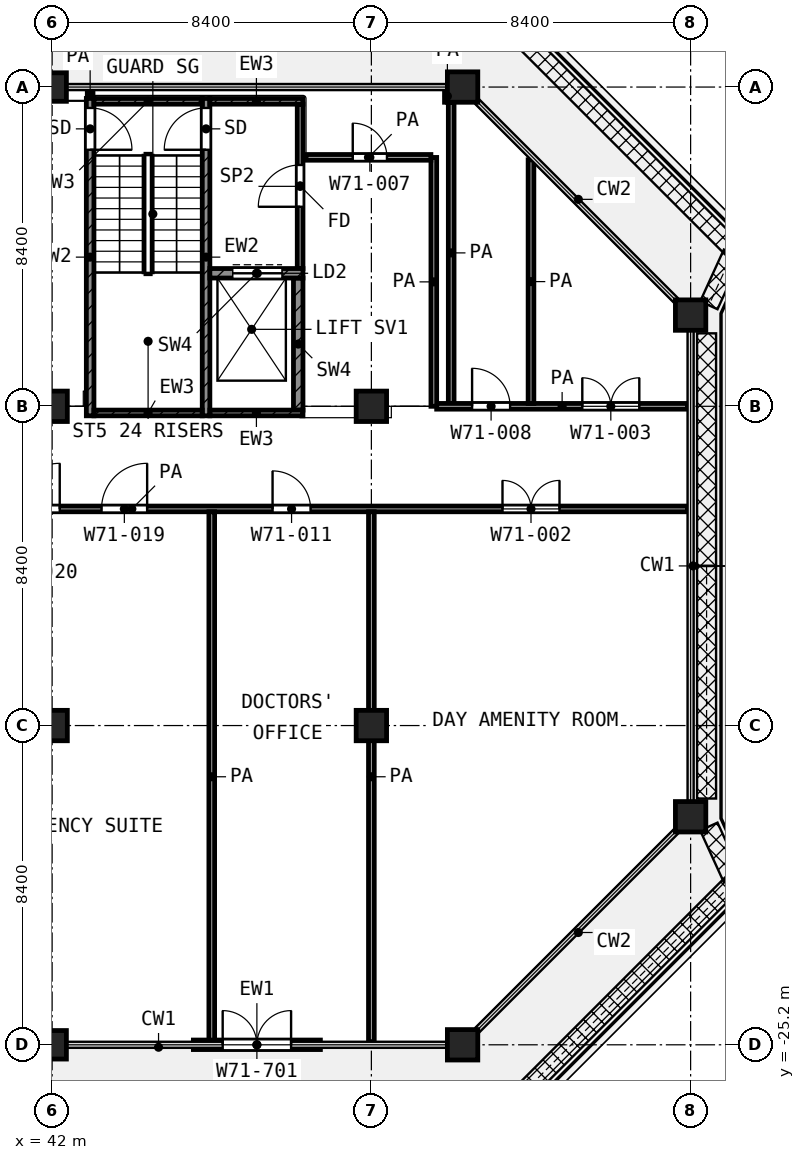
"""IFC4 building model, lengths in metres.
Left out: names, types, materials, properties, quantities, classifications, styles, units other than length and angle.
Written with IfcOpenShell. Run it as: python <this file> out.ifc"""

import sys

from ifc_helpers import new_model, si_unit, direction, frame, frame_2d, origin, origin_2d, place, context, subcontext, project, spatial, rectangle, extrude, element, fill, save


model = new_model("IFC4")
c1 = context("Model", 3, precision=1e-05, world=origin(), true_north=direction((0.0, 1.0)))
c2 = subcontext(c1, "Body", "Model", "MODEL_VIEW")
j1 = project(units=[si_unit("LENGTHUNIT", "METRE"), si_unit("PLANEANGLEUNIT", "RADIAN")], contexts=[c1])
p1 = place(None, origin())
s1 = spatial("IfcSite", under=j1, at=p1, CompositionType="ELEMENT")
p2 = place(p1, origin())
s2 = spatial("IfcBuilding", under=s1, at=p2, CompositionType="ELEMENT")
p3 = place(p2, frame((0.0, 0.0, 328.0)))
s3 = spatial("IfcBuildingStorey", under=s2, at=p3, CompositionType="ELEMENT", Elevation=328.0)
p4 = place(p3, frame((42.0, 0.0, 0.0), z_axis=(0.0, 0.0, 1.0), x_axis=(1.0, 0.0, 0.0)))
e1 = element("IfcColumn", 1, at=p4, inside=s3, PredefinedType="COLUMN", context=c2, shape_type="SweptSolid", body=[
    extrude(rectangle(XDim=0.75, YDim=0.75, at=origin_2d()), origin(), (0.0, 0.0, 1.0), 4.2),
])
for number, where, z_axis, x_axis in (
    (2, (52.8, 0.0, 0.0), (0.0, 0.0, 1.0), (1.0, 0.0, 0.0)),
    (3, (58.8, -6.0, 0.0), (0.0, 0.0, 1.0), (1.0, 0.0, 0.0)),
    (4, (42.0, -8.4, 0.0), (0.0, 0.0, 1.0), (1.0, 0.0, 0.0)),
    (5, (50.4, -8.4, 0.0), (0.0, 0.0, 1.0), (1.0, 0.0, 0.0)),
    (6, (42.0, -16.8, 0.0), (0.0, 0.0, 1.0), (1.0, 0.0, 0.0)),
    (7, (50.4, -16.8, 0.0), (0.0, 0.0, 1.0), (1.0, 0.0, 0.0)),
    (8, (58.8, -19.2, 0.0), (0.0, 0.0, 1.0), (1.0, 0.0, 0.0)),
):
    element("IfcColumn", number, at=place(p3, frame(where, z_axis=z_axis, x_axis=x_axis)), inside=s3, PredefinedType="COLUMN", context=c2, shape_type="SweptSolid", body=[
        extrude(rectangle(XDim=0.8, YDim=0.8, at=origin_2d()), origin(), (0.0, 0.0, 1.0), 4.2),
    ])
p5 = place(p3, frame((42.0, -25.2, 0.0), z_axis=(0.0, 0.0, 1.0), x_axis=(1.0, 0.0, 0.0)))
e9 = element("IfcColumn", 9, at=p5, inside=s3, PredefinedType="COLUMN", context=c2, shape_type="SweptSolid", body=[
    extrude(rectangle(XDim=0.75, YDim=0.75, at=origin_2d()), origin(), (0.0, 0.0, 1.0), 4.2),
])
p6 = place(p3, frame((52.8, -25.2, 0.0), z_axis=(0.0, 0.0, 1.0), x_axis=(1.0, 0.0, 0.0)))
e10 = element("IfcColumn", 10, at=p6, inside=s3, PredefinedType="COLUMN", context=c2, shape_type="SweptSolid", body=[
    extrude(rectangle(XDim=0.8, YDim=0.8, at=origin_2d()), origin(), (0.0, 0.0, 1.0), 4.2),
])
p7 = place(p3, frame((45.717, -25.2, 0.0), z_axis=(0.0, 0.0, 1.0), x_axis=(1.0, 0.0, 0.0)))
e11 = element("IfcWall", 11, at=p7, inside=s3, PredefinedType="SOLIDWALL", context=c2, shape_type="SweptSolid", body=[
    extrude(rectangle(XDim=3.342, YDim=0.25, at=frame_2d((1.671, 0.0))), origin(), (0.0, 0.0, 1.0), 3.66),
])
p8 = place(p7, frame((0.771, 0.0, 0.0)))
e12 = element("IfcOpeningElement", 12, at=p8, cuts=e11, PredefinedType="OPENING", context=c2, shape_type="SweptSolid", body=[
    extrude(rectangle(XDim=1.8, YDim=2.1, at=frame_2d((0.9, 1.05))), frame((0.0, 0.135, 0.0), z_axis=(0.0, -1.0, 0.0), x_axis=(1.0, 0.0, 0.0)), (0.0, 0.0, 1.0), 0.27),
])
p9 = place(p3, frame((43.0, -8.65, 0.0), z_axis=(0.0, 0.0, 1.0), x_axis=(0.0, 1.0, 0.0)))
e13 = element("IfcWall", 13, at=p9, inside=s3, PredefinedType="SHEAR", context=c2, shape_type="SweptSolid", body=[
    extrude(rectangle(XDim=8.35, YDim=0.2, at=frame_2d((4.175, 0.0))), origin(), (0.0, 0.0, 1.0), 3.78),
])
p10 = place(p9, frame((7.0, 0.0, 0.0)))
e14 = element("IfcOpeningElement", 14, at=p10, cuts=e13, PredefinedType="OPENING", context=c2, shape_type="SweptSolid", body=[
    extrude(rectangle(XDim=1.1, YDim=2.1, at=frame_2d((0.55, 1.05))), frame((0.0, 0.11, 0.0), z_axis=(0.0, -1.0, 0.0), x_axis=(1.0, 0.0, 0.0)), (0.0, 0.0, 1.0), 0.22),
])
p11 = place(p3, frame((46.05, -8.65, 0.0), z_axis=(0.0, 0.0, 1.0), x_axis=(0.0, 1.0, 0.0)))
e15 = element("IfcWall", 15, at=p11, inside=s3, PredefinedType="SHEAR", context=c2, shape_type="SweptSolid", body=[
    extrude(rectangle(XDim=8.35, YDim=0.2, at=frame_2d((4.175, 0.0))), origin(), (0.0, 0.0, 1.0), 3.78),
])
p12 = place(p11, frame((7.0, 0.0, 0.0)))
e16 = element("IfcOpeningElement", 16, at=p12, cuts=e15, PredefinedType="OPENING", context=c2, shape_type="SweptSolid", body=[
    extrude(rectangle(XDim=1.1, YDim=2.1, at=frame_2d((0.55, 1.05))), frame((0.0, 0.11, 0.0), z_axis=(0.0, -1.0, 0.0), x_axis=(1.0, 0.0, 0.0)), (0.0, 0.0, 1.0), 0.22),
])
p13 = place(p3, frame((43.1, -0.375, 0.0), z_axis=(0.0, 0.0, 1.0), x_axis=(1.0, 0.0, 0.0)))
e17 = element("IfcWall", 17, at=p13, inside=s3, PredefinedType="SHEAR", context=c2, shape_type="SweptSolid", body=[
    extrude(rectangle(XDim=2.85, YDim=0.15, at=frame_2d((1.425, 0.0))), origin(), (0.0, 0.0, 1.0), 3.78),
])
p14 = place(p3, frame((46.15, -0.375, 0.0), z_axis=(0.0, 0.0, 1.0), x_axis=(1.0, 0.0, 0.0)))
e18 = element("IfcWall", 18, at=p14, inside=s3, PredefinedType="SHEAR", context=c2, shape_type="SweptSolid", body=[
    extrude(rectangle(XDim=2.45, YDim=0.15, at=frame_2d((1.225, 0.0))), origin(), (0.0, 0.0, 1.0), 3.78),
])
p15 = place(p3, frame((43.1, -8.575, 0.0), z_axis=(0.0, 0.0, 1.0), x_axis=(1.0, 0.0, 0.0)))
e19 = element("IfcWall", 19, at=p15, inside=s3, PredefinedType="SHEAR", context=c2, shape_type="SweptSolid", body=[
    extrude(rectangle(XDim=2.85, YDim=0.15, at=frame_2d((1.425, 0.0))), origin(), (0.0, 0.0, 1.0), 3.78),
])
p16 = place(p3, frame((46.15, -8.575, 0.0), z_axis=(0.0, 0.0, 1.0), x_axis=(1.0, 0.0, 0.0)))
e20 = element("IfcWall", 20, at=p16, inside=s3, PredefinedType="SHEAR", context=c2, shape_type="SweptSolid", body=[
    extrude(rectangle(XDim=2.45, YDim=0.15, at=frame_2d((1.225, 0.0))), origin(), (0.0, 0.0, 1.0), 3.78),
])
p17 = place(p3, frame((46.15, -4.9, 0.0), z_axis=(0.0, 0.0, 1.0), x_axis=(1.0, 0.0, 0.0)))
e21 = element("IfcWall", 21, at=p17, inside=s3, PredefinedType="SHEAR", context=c2, shape_type="SweptSolid", body=[
    extrude(rectangle(XDim=2.45, YDim=0.25, at=frame_2d((1.225, 0.0))), origin(), (0.0, 0.0, 1.0), 3.78),
])
p18 = place(p17, frame((0.6, 0.0, 0.0)))
e22 = element("IfcOpeningElement", 22, at=p18, cuts=e21, PredefinedType="OPENING", context=c2, shape_type="SweptSolid", body=[
    extrude(rectangle(XDim=1.3, YDim=2.1, at=frame_2d((0.65, 1.05))), frame((0.0, 0.135, 0.0), z_axis=(0.0, -1.0, 0.0), x_axis=(1.0, 0.0, 0.0)), (0.0, 0.0, 1.0), 0.27),
])
p19 = place(p3, frame((48.475, -8.5, 0.0), z_axis=(0.0, 0.0, 1.0), x_axis=(0.0, 1.0, 0.0)))
e23 = element("IfcWall", 23, at=p19, inside=s3, PredefinedType="SHEAR", context=c2, shape_type="SweptSolid", body=[
    extrude(rectangle(XDim=3.475, YDim=0.25, at=frame_2d((1.738, 0.0))), origin(), (0.0, 0.0, 1.0), 3.78),
])
p20 = place(p3, frame((48.525, -4.775, 0.0), z_axis=(0.0, 0.0, 1.0), x_axis=(0.0, 1.0, 0.0)))
e24 = element("IfcWall", 24, at=p20, inside=s3, PredefinedType="PARTITIONING", context=c2, shape_type="SweptSolid", body=[
    extrude(rectangle(XDim=4.325, YDim=0.15, at=frame_2d((2.163, 0.0))), origin(), (0.0, 0.0, 1.0), 3.78),
])
p21 = place(p20, frame((1.625, 0.0, 0.0)))
e25 = element("IfcOpeningElement", 25, at=p21, cuts=e24, PredefinedType="OPENING", context=c2, shape_type="SweptSolid", body=[
    extrude(rectangle(XDim=1.1, YDim=2.1, at=frame_2d((0.55, 1.05))), frame((0.0, 0.085, 0.0), z_axis=(0.0, -1.0, 0.0), x_axis=(1.0, 0.0, 0.0)), (0.0, 0.0, 1.0), 0.17),
])
p22 = place(p3, frame((29.475, -11.1, 0.0), z_axis=(0.0, 0.0, 1.0), x_axis=(1.0, 0.0, 0.0)))
e26 = element("IfcWall", 26, at=p22, inside=s3, PredefinedType="PARTITIONING", context=c2, shape_type="SweptSolid", body=[
    extrude(rectangle(XDim=29.245, YDim=0.15, at=frame_2d((14.623, 0.0))), origin(), (0.0, 0.0, 1.0), 3.78),
])
p23 = place(p22, frame((1.425, 0.0, 0.0)))
e27 = element("IfcOpeningElement", 27, at=p23, cuts=e26, PredefinedType="OPENING", context=c2, shape_type="SweptSolid", body=[
    extrude(rectangle(XDim=1.2, YDim=2.1, at=frame_2d((0.6, 1.05))), frame((0.0, 0.085, 0.0), z_axis=(0.0, -1.0, 0.0), x_axis=(1.0, 0.0, 0.0)), (0.0, 0.0, 1.0), 0.17),
])
p24 = place(p22, frame((5.425, 0.0, 0.0)))
e28 = element("IfcOpeningElement", 28, at=p24, cuts=e26, PredefinedType="OPENING", context=c2, shape_type="SweptSolid", body=[
    extrude(rectangle(XDim=1.0, YDim=2.1, at=frame_2d((0.5, 1.05))), frame((0.0, 0.085, 0.0), z_axis=(0.0, -1.0, 0.0), x_axis=(1.0, 0.0, 0.0)), (0.0, 0.0, 1.0), 0.17),
])
p25 = place(p22, frame((13.825, 0.0, 0.0)))
e29 = element("IfcOpeningElement", 29, at=p25, cuts=e26, PredefinedType="OPENING", context=c2, shape_type="SweptSolid", body=[
    extrude(rectangle(XDim=1.2, YDim=2.1, at=frame_2d((0.6, 1.05))), frame((0.0, 0.085, 0.0), z_axis=(0.0, -1.0, 0.0), x_axis=(1.0, 0.0, 0.0)), (0.0, 0.0, 1.0), 0.17),
])
p26 = place(p22, frame((11.525, 0.0, 0.0)))
e30 = element("IfcOpeningElement", 30, at=p26, cuts=e26, PredefinedType="OPENING", context=c2, shape_type="SweptSolid", body=[
    extrude(rectangle(XDim=1.2, YDim=2.1, at=frame_2d((0.6, 1.05))), frame((0.0, 0.085, 0.0), z_axis=(0.0, -1.0, 0.0), x_axis=(1.0, 0.0, 0.0)), (0.0, 0.0, 1.0), 0.17),
])
p27 = place(p22, frame((18.325, 0.0, 0.0)))
e31 = element("IfcOpeningElement", 31, at=p27, cuts=e26, PredefinedType="OPENING", context=c2, shape_type="SweptSolid", body=[
    extrude(rectangle(XDim=1.0, YDim=2.1, at=frame_2d((0.5, 1.05))), frame((0.0, 0.085, 0.0), z_axis=(0.0, -1.0, 0.0), x_axis=(1.0, 0.0, 0.0)), (0.0, 0.0, 1.0), 0.17),
])
p28 = place(p22, frame((24.375, 0.0, 0.0)))
e32 = element("IfcOpeningElement", 32, at=p28, cuts=e26, PredefinedType="OPENING", context=c2, shape_type="SweptSolid", body=[
    extrude(rectangle(XDim=1.5, YDim=2.1, at=frame_2d((0.75, 1.05))), frame((0.0, 0.085, 0.0), z_axis=(0.0, -1.0, 0.0), x_axis=(1.0, 0.0, 0.0)), (0.0, 0.0, 1.0), 0.17),
])
p29 = place(p3, frame((52.118, -8.4, 0.0), z_axis=(0.0, 0.0, 1.0), x_axis=(1.0, 0.0, 0.0)))
e33 = element("IfcWall", 33, at=p29, inside=s3, PredefinedType="PARTITIONING", context=c2, shape_type="SweptSolid", body=[
    extrude(rectangle(XDim=6.602, YDim=0.15, at=frame_2d((3.301, 0.0))), origin(), (0.0, 0.0, 1.0), 3.78),
])
p30 = place(p29, frame((0.932, 0.0, 0.0)))
e34 = element("IfcOpeningElement", 34, at=p30, cuts=e33, PredefinedType="OPENING", context=c2, shape_type="SweptSolid", body=[
    extrude(rectangle(XDim=1.0, YDim=2.1, at=frame_2d((0.5, 1.05))), frame((0.0, 0.085, 0.0), z_axis=(0.0, -1.0, 0.0), x_axis=(1.0, 0.0, 0.0)), (0.0, 0.0, 1.0), 0.17),
])
p31 = place(p29, frame((3.832, 0.0, 0.0)))
e35 = element("IfcOpeningElement", 35, at=p31, cuts=e33, PredefinedType="OPENING", context=c2, shape_type="SweptSolid", body=[
    extrude(rectangle(XDim=1.5, YDim=2.1, at=frame_2d((0.75, 1.05))), frame((0.0, 0.085, 0.0), z_axis=(0.0, -1.0, 0.0), x_axis=(1.0, 0.0, 0.0)), (0.0, 0.0, 1.0), 0.17),
])
p32 = place(p3, frame((48.68, -1.85, 0.0), z_axis=(0.0, 0.0, 1.0), x_axis=(1.0, 0.0, 0.0)))
e36 = element("IfcWall", 36, at=p32, inside=s3, PredefinedType="PARTITIONING", context=c2, shape_type="SweptSolid", body=[
    extrude(rectangle(XDim=3.286, YDim=0.15, at=frame_2d((1.643, 0.0))), origin(), (0.0, 0.0, 1.0), 3.78),
])
p33 = place(p32, frame((1.23, 0.0, 0.0)))
e37 = element("IfcOpeningElement", 37, at=p33, cuts=e36, PredefinedType="OPENING", context=c2, shape_type="SweptSolid", body=[
    extrude(rectangle(XDim=0.9, YDim=2.1, at=frame_2d((0.45, 1.05))), frame((0.0, 0.085, 0.0), z_axis=(0.0, -1.0, 0.0), x_axis=(1.0, 0.0, 0.0)), (0.0, 0.0, 1.0), 0.17),
])
p34 = place(p3, frame((43.0, -0.27, 0.0), z_axis=(0.0, 0.0, 1.0), x_axis=(0.0, 1.0, 0.0)))
e38 = element("IfcWall", 38, at=p34, inside=s3, PredefinedType="PARTITIONING", context=c2, shape_type="SweptSolid", body=[
    extrude(rectangle(XDim=0.19, YDim=0.15, at=frame_2d((0.095, 0.0))), origin(), (0.0, 0.0, 1.0), 3.78),
])
for number, where, z_axis, x_axis in (
    (39, (46.2, -25.12, 0.0), (0.0, 0.0, 1.0), (0.0, 1.0, 0.0)),
    (40, (50.4, -25.12, 0.0), (0.0, 0.0, 1.0), (0.0, 1.0, 0.0)),
):
    element("IfcWall", number, at=place(p3, frame(where, z_axis=z_axis, x_axis=x_axis)), inside=s3, PredefinedType="PARTITIONING", context=c2, shape_type="SweptSolid", body=[
        extrude(rectangle(XDim=13.945, YDim=0.15, at=frame_2d((6.973, 0.0))), origin(), (0.0, 0.0, 1.0), 3.78),
    ])
p35 = place(p3, frame((52.043, -8.4, 0.0), z_axis=(0.0, 0.0, 1.0), x_axis=(0.0, 1.0, 0.0)))
e41 = element("IfcWall", 41, at=p35, inside=s3, PredefinedType="PARTITIONING", context=c2, shape_type="SweptSolid", body=[
    extrude(rectangle(XDim=6.548, YDim=0.15, at=frame_2d((3.274, 0.0))), origin(), (0.0, 0.0, 1.0), 3.78),
])
p36 = place(p3, frame((52.4, -0.4, 0.0), z_axis=(0.0, 0.0, 1.0), x_axis=(0.0, 1.0, 0.0)))
e42 = element("IfcWall", 42, at=p36, inside=s3, PredefinedType="PARTITIONING", context=c2, shape_type="SweptSolid", body=[
    extrude(rectangle(XDim=0.32, YDim=0.15, at=frame_2d((0.16, 0.0))), origin(), (0.0, 0.0, 1.0), 3.78),
])
p37 = place(p3, frame((52.5, -8.325, 0.0), z_axis=(0.0, 0.0, 1.0), x_axis=(0.0, 1.0, 0.0)))
e43 = element("IfcWall", 43, at=p37, inside=s3, PredefinedType="PARTITIONING", context=c2, shape_type="SweptSolid", body=[
    extrude(rectangle(XDim=7.923, YDim=0.15, at=frame_2d((3.961, 0.0))), origin(), (0.0, 0.0, 1.0), 3.78),
])
p38 = place(p3, frame((54.6, -8.325, 0.0), z_axis=(0.0, 0.0, 1.0), x_axis=(0.0, 1.0, 0.0)))
e44 = element("IfcWall", 44, at=p38, inside=s3, PredefinedType="PARTITIONING", context=c2, shape_type="SweptSolid", body=[
    extrude(rectangle(XDim=6.412, YDim=0.15, at=frame_2d((3.206, 0.0))), origin(), (0.0, 0.0, 1.0), 3.78),
])
p39 = place(p8, origin())
e45 = element("IfcDoor", 45, at=p39, inside=s3, OperationType="DOUBLE_DOOR_SINGLE_SWING", PredefinedType="DOOR", context=c2, shape_type="SweptSolid", body=[
    extrude(rectangle(XDim=1.8, YDim=2.1, at=frame_2d((0.9, 1.05))), frame((0.0, 0.025, 0.0), z_axis=(0.0, -1.0, 0.0), x_axis=(1.0, 0.0, 0.0)), (0.0, 0.0, 1.0), 0.05),
])
fill(e12, e45)
p40 = place(p10, frame((1.1, 0.0, 0.0), z_axis=(0.0, 0.0, 1.0), x_axis=(-1.0, 0.0, 0.0)))
e46 = element("IfcDoor", 46, at=p40, inside=s3, OperationType="SINGLE_SWING_LEFT", PredefinedType="DOOR", context=c2, shape_type="SweptSolid", body=[
    extrude(rectangle(XDim=1.1, YDim=2.1, at=frame_2d((0.55, 1.05))), frame((0.0, 0.025, 0.0), z_axis=(0.0, -1.0, 0.0), x_axis=(1.0, 0.0, 0.0)), (0.0, 0.0, 1.0), 0.05),
])
fill(e14, e46)
p41 = place(p12, origin())
e47 = element("IfcDoor", 47, at=p41, inside=s3, OperationType="SINGLE_SWING_LEFT", PredefinedType="DOOR", context=c2, shape_type="SweptSolid", body=[
    extrude(rectangle(XDim=1.1, YDim=2.1, at=frame_2d((0.55, 1.05))), frame((0.0, 0.025, 0.0), z_axis=(0.0, -1.0, 0.0), x_axis=(1.0, 0.0, 0.0)), (0.0, 0.0, 1.0), 0.05),
])
fill(e16, e47)
p42 = place(p18, origin())
e48 = element("IfcDoor", 48, at=p42, inside=s3, OperationType="DOUBLE_DOOR_SLIDING", PredefinedType="DOOR", context=c2, shape_type="SweptSolid", body=[
    extrude(rectangle(XDim=1.3, YDim=2.1, at=frame_2d((0.65, 1.05))), frame((0.0, 0.025, 0.0), z_axis=(0.0, -1.0, 0.0), x_axis=(1.0, 0.0, 0.0)), (0.0, 0.0, 1.0), 0.05),
])
fill(e22, e48)
p43 = place(p21, origin())
e49 = element("IfcDoor", 49, at=p43, inside=s3, OperationType="SINGLE_SWING_LEFT", PredefinedType="DOOR", context=c2, shape_type="SweptSolid", body=[
    extrude(rectangle(XDim=1.1, YDim=2.1, at=frame_2d((0.55, 1.05))), frame((0.0, 0.025, 0.0), z_axis=(0.0, -1.0, 0.0), x_axis=(1.0, 0.0, 0.0)), (0.0, 0.0, 1.0), 0.05),
])
fill(e25, e49)
p44 = place(p25, origin())
e50 = element("IfcDoor", 50, at=p44, inside=s3, OperationType="SINGLE_SWING_RIGHT", PredefinedType="DOOR", context=c2, shape_type="SweptSolid", body=[
    extrude(rectangle(XDim=1.2, YDim=2.1, at=frame_2d((0.6, 1.05))), frame((0.0, 0.025, 0.0), z_axis=(0.0, -1.0, 0.0), x_axis=(1.0, 0.0, 0.0)), (0.0, 0.0, 1.0), 0.05),
])
fill(e29, e50)
p45 = place(p26, origin())
e51 = element("IfcDoor", 51, at=p45, inside=s3, OperationType="SINGLE_SWING_RIGHT", PredefinedType="DOOR", context=c2, shape_type="SweptSolid", body=[
    extrude(rectangle(XDim=1.2, YDim=2.1, at=frame_2d((0.6, 1.05))), frame((0.0, 0.025, 0.0), z_axis=(0.0, -1.0, 0.0), x_axis=(1.0, 0.0, 0.0)), (0.0, 0.0, 1.0), 0.05),
])
fill(e30, e51)
p46 = place(p27, origin())
e52 = element("IfcDoor", 52, at=p46, inside=s3, OperationType="SINGLE_SWING_LEFT", PredefinedType="DOOR", context=c2, shape_type="SweptSolid", body=[
    extrude(rectangle(XDim=1.0, YDim=2.1, at=frame_2d((0.5, 1.05))), frame((0.0, 0.025, 0.0), z_axis=(0.0, -1.0, 0.0), x_axis=(1.0, 0.0, 0.0)), (0.0, 0.0, 1.0), 0.05),
])
fill(e31, e52)
p47 = place(p28, origin())
e53 = element("IfcDoor", 53, at=p47, inside=s3, OperationType="DOUBLE_DOOR_SINGLE_SWING", PredefinedType="DOOR", context=c2, shape_type="SweptSolid", body=[
    extrude(rectangle(XDim=1.5, YDim=2.1, at=frame_2d((0.75, 1.05))), frame((0.0, 0.025, 0.0), z_axis=(0.0, -1.0, 0.0), x_axis=(1.0, 0.0, 0.0)), (0.0, 0.0, 1.0), 0.05),
])
fill(e32, e53)
p48 = place(p33, origin())
e54 = element("IfcDoor", 54, at=p48, inside=s3, OperationType="SINGLE_SWING_LEFT", PredefinedType="DOOR", context=c2, shape_type="SweptSolid", body=[
    extrude(rectangle(XDim=0.9, YDim=2.1, at=frame_2d((0.45, 1.05))), frame((0.0, 0.025, 0.0), z_axis=(0.0, -1.0, 0.0), x_axis=(1.0, 0.0, 0.0)), (0.0, 0.0, 1.0), 0.05),
])
fill(e37, e54)
p49 = place(p30, origin())
e55 = element("IfcDoor", 55, at=p49, inside=s3, OperationType="SINGLE_SWING_LEFT", PredefinedType="DOOR", context=c2, shape_type="SweptSolid", body=[
    extrude(rectangle(XDim=1.0, YDim=2.1, at=frame_2d((0.5, 1.05))), frame((0.0, 0.025, 0.0), z_axis=(0.0, -1.0, 0.0), x_axis=(1.0, 0.0, 0.0)), (0.0, 0.0, 1.0), 0.05),
])
fill(e34, e55)
p50 = place(p31, origin())
e56 = element("IfcDoor", 56, at=p50, inside=s3, OperationType="DOUBLE_DOOR_SINGLE_SWING", PredefinedType="DOOR", context=c2, shape_type="SweptSolid", body=[
    extrude(rectangle(XDim=1.5, YDim=2.1, at=frame_2d((0.75, 1.05))), frame((0.0, 0.025, 0.0), z_axis=(0.0, -1.0, 0.0), x_axis=(1.0, 0.0, 0.0)), (0.0, 0.0, 1.0), 0.05),
])
fill(e35, e56)
save(model, sys.argv[1])
